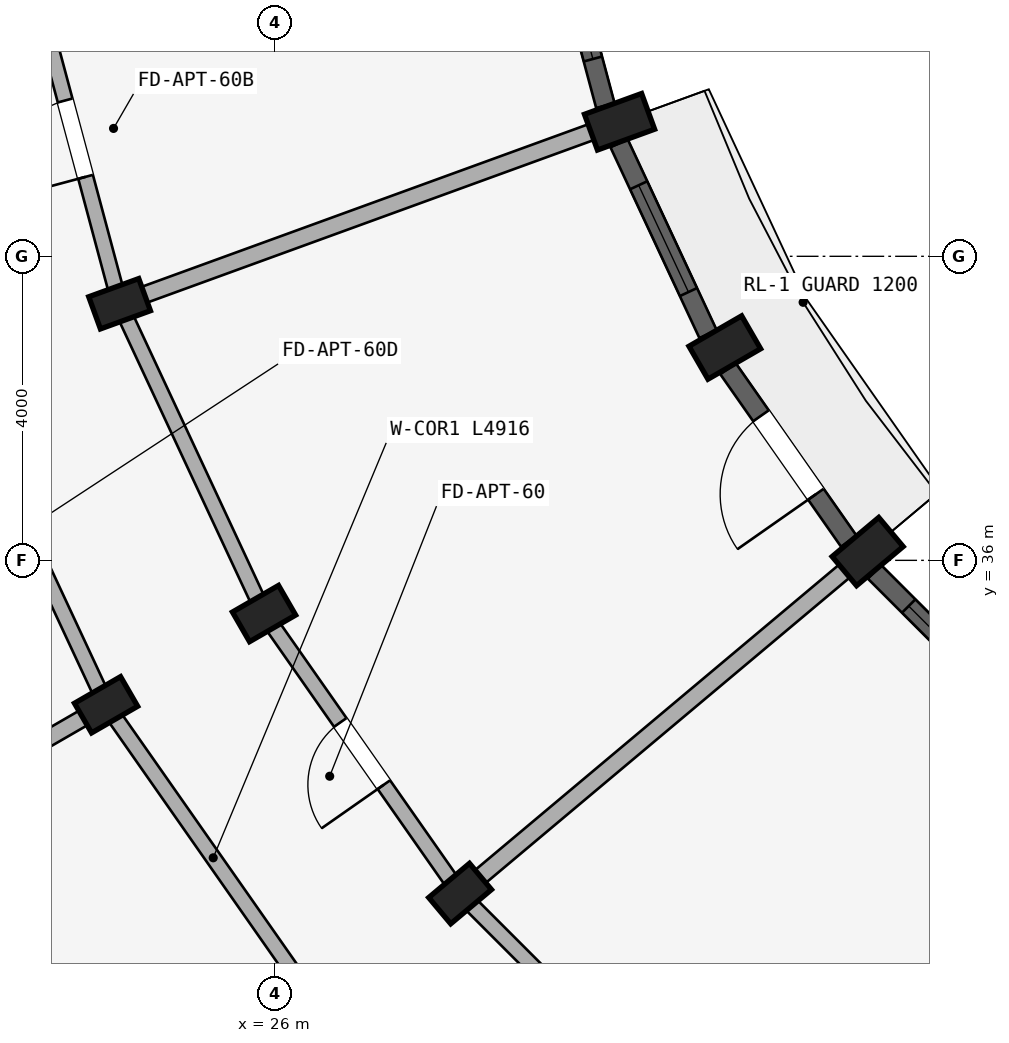
"""IFC4 building model, lengths in metres.
Left out: names, types, materials, properties, quantities, classifications, styles, units other than length and angle.
Written with IfcOpenShell. Run it as: python <this file> out.ifc"""

import sys

from ifc_helpers import new_model, si_unit, direction, frame, frame_2d, origin, origin_2d, place, context, subcontext, project, spatial, rectangle, extrude, element, fill, save


model = new_model("IFC4")
c1 = context("Model", 3, precision=1e-05, world=origin(), true_north=direction((0.0, 1.0)))
c2 = subcontext(c1, "Body", "Model", "MODEL_VIEW")
j1 = project(units=[si_unit("LENGTHUNIT", "METRE"), si_unit("PLANEANGLEUNIT", "RADIAN")], contexts=[c1])
p1 = place(None, origin())
s1 = spatial("IfcSite", under=j1, at=p1, CompositionType="ELEMENT")
p2 = place(p1, origin())
s2 = spatial("IfcBuilding", under=s1, at=p2, CompositionType="ELEMENT")
p3 = place(p2, frame((0.0, 0.0, 21.3)))
s3 = spatial("IfcBuildingStorey", under=s2, at=p3, CompositionType="ELEMENT", Elevation=21.3)
p4 = place(p3, frame((33.798, 36.115, 0.0), z_axis=(0.0, 0.0, 1.0), x_axis=(-0.642787609687, 0.766044443119, 0.0)))
e1 = element("IfcColumn", 1, at=p4, inside=s3, PredefinedType="COLUMN", context=c2, shape_type="SweptSolid", body=[
    extrude(rectangle(XDim=0.5, YDim=0.8, at=origin_2d()), origin(), (0.0, 0.0, 1.0), 2.93),
])
p5 = place(p3, frame((28.436, 31.616, 0.0), z_axis=(0.0, 0.0, 1.0), x_axis=(-0.642787609687, 0.766044443119, 0.0)))
e2 = element("IfcColumn", 2, at=p5, inside=s3, PredefinedType="COLUMN", context=c2, shape_type="SweptSolid", body=[
    extrude(rectangle(XDim=0.45, YDim=0.7, at=origin_2d()), origin(), (0.0, 0.0, 1.0), 2.93),
])
p6 = place(p3, frame((31.919, 38.8, 0.0), z_axis=(0.0, 0.0, 1.0), x_axis=(-0.5, 0.866025403784, 0.0)))
e3 = element("IfcColumn", 3, at=p6, inside=s3, PredefinedType="COLUMN", context=c2, shape_type="SweptSolid", body=[
    extrude(rectangle(XDim=0.5, YDim=0.8, at=origin_2d()), origin(), (0.0, 0.0, 1.0), 2.93),
])
for number, where, z_axis, x_axis in (
    (4, (25.856, 35.3, 0.0), (0.0, 0.0, 1.0), (-0.5, 0.866, 0.0)),
    (5, (23.778, 34.1, 0.0), (0.0, 0.0, 1.0), (-0.5, 0.866, 0.0)),
):
    element("IfcColumn", number, at=place(p3, frame(where, z_axis=z_axis, x_axis=x_axis)), inside=s3, PredefinedType="COLUMN", context=c2, shape_type="SweptSolid", body=[
        extrude(rectangle(XDim=0.45, YDim=0.7, at=origin_2d()), origin(), (0.0, 0.0, 1.0), 2.93),
    ])
p7 = place(p3, frame((30.534, 41.77, 0.0), z_axis=(0.0, 0.0, 1.0), x_axis=(-0.342020143326, 0.939692620786, 0.0)))
e6 = element("IfcColumn", 6, at=p7, inside=s3, PredefinedType="COLUMN", context=c2, shape_type="SweptSolid", body=[
    extrude(rectangle(XDim=0.5, YDim=0.8, at=origin_2d()), origin(), (0.0, 0.0, 1.0), 2.93),
])
p8 = place(p3, frame((23.956, 39.376, 0.0), z_axis=(0.0, 0.0, 1.0), x_axis=(-0.342020143326, 0.939692620786, 0.0)))
e7 = element("IfcColumn", 7, at=p8, inside=s3, PredefinedType="COLUMN", context=c2, shape_type="SweptSolid", body=[
    extrude(rectangle(XDim=0.45, YDim=0.7, at=origin_2d()), origin(), (0.0, 0.0, 1.0), 2.93),
])
p9 = place(p3, frame((31.616, 28.436, 0.0), z_axis=(0.0, 0.0, 1.0), x_axis=(-0.707106781187, 0.707106781187, 0.0)))
e8 = element("IfcWall", 8, at=p9, inside=s3, PredefinedType="STANDARD", context=c2, shape_type="SweptSolid", body=[
    extrude(rectangle(XDim=4.497, YDim=0.2, at=frame_2d((2.249, 0.0))), origin(), (0.0, 0.0, 1.0), 2.372),
])
p10 = place(p3, frame((28.436, 31.616, 0.0), z_axis=(0.0, 0.0, 1.0), x_axis=(-0.573571637217, 0.819155404658, 0.0)))
e9 = element("IfcWall", 9, at=p10, inside=s3, PredefinedType="STANDARD", context=c2, shape_type="SweptSolid", body=[
    extrude(rectangle(XDim=4.497, YDim=0.2, at=frame_2d((2.249, 0.0))), origin(), (0.0, 0.0, 1.0), 2.372),
])
p11 = place(p10, frame((1.749, 0.0, 0.0)))
e10 = element("IfcOpeningElement", 10, at=p11, cuts=e9, PredefinedType="OPENING", context=c2, shape_type="SweptSolid", body=[
    extrude(rectangle(XDim=1.0, YDim=2.15, at=frame_2d((0.5, 1.075))), frame((0.0, 0.11, 0.0), z_axis=(0.0, -1.0, 0.0), x_axis=(1.0, 0.0, 0.0)), (0.0, 0.0, 1.0), 0.22),
])
p12 = place(p3, frame((26.598, 30.073, 0.0), z_axis=(0.0, 0.0, 1.0), x_axis=(-0.573592335331, 0.819140911474, 0.0)))
e11 = element("IfcWall", 11, at=p12, inside=s3, PredefinedType="STANDARD", context=c2, shape_type="SweptSolid", body=[
    extrude(rectangle(XDim=4.916, YDim=0.2, at=frame_2d((2.458, 0.0))), origin(), (0.0, 0.0, 1.0), 2.372),
])
p13 = place(p3, frame((25.856, 35.3, 0.0), z_axis=(0.0, 0.0, 1.0), x_axis=(-0.422617978463, 0.906307919131, 0.0)))
e12 = element("IfcWall", 12, at=p13, inside=s3, PredefinedType="STANDARD", context=c2, shape_type="SweptSolid", body=[
    extrude(rectangle(XDim=4.497, YDim=0.2, at=frame_2d((2.249, 0.0))), origin(), (0.0, 0.0, 1.0), 2.372),
])
p14 = place(p3, frame((23.778, 34.1, 0.0), z_axis=(0.0, 0.0, 1.0), x_axis=(-0.422629854778, 0.906302381024, 0.0)))
e13 = element("IfcWall", 13, at=p14, inside=s3, PredefinedType="STANDARD", context=c2, shape_type="SweptSolid", body=[
    extrude(rectangle(XDim=4.915, YDim=0.2, at=frame_2d((2.458, 0.0))), origin(), (0.0, 0.0, 1.0), 2.372),
])
p15 = place(p14, frame((1.888, 0.0, 0.0)))
e14 = element("IfcOpeningElement", 14, at=p15, cuts=e13, PredefinedType="OPENING", context=c2, shape_type="SweptSolid", body=[
    extrude(rectangle(XDim=1.14, YDim=2.15, at=frame_2d((0.57, 1.075))), frame((0.0, 0.11, 0.0), z_axis=(0.0, -1.0, 0.0), x_axis=(1.0, 0.0, 0.0)), (0.0, 0.0, 1.0), 0.22),
])
p16 = place(p3, frame((23.956, 39.376, 0.0), z_axis=(0.0, 0.0, 1.0), x_axis=(-0.258787642463, 0.965934240054, 0.0)))
e15 = element("IfcWall", 15, at=p16, inside=s3, PredefinedType="STANDARD", context=c2, shape_type="SweptSolid", body=[
    extrude(rectangle(XDim=4.497, YDim=0.2, at=frame_2d((2.249, 0.0))), origin(), (0.0, 0.0, 1.0), 2.372),
])
p17 = place(p16, frame((1.729, 0.0, 0.0)))
e16 = element("IfcOpeningElement", 16, at=p17, cuts=e15, PredefinedType="OPENING", context=c2, shape_type="SweptSolid", body=[
    extrude(rectangle(XDim=1.04, YDim=2.15, at=frame_2d((0.52, 1.075))), frame((0.0, 0.11, 0.0), z_axis=(0.0, -1.0, 0.0), x_axis=(1.0, 0.0, 0.0)), (0.0, 0.0, 1.0), 0.22),
])
p18 = place(p3, frame((33.645, 35.987, 0.0), z_axis=(0.0, 0.0, 1.0), x_axis=(-0.766046761698, -0.642784846501, 0.0)))
e17 = element("IfcWall", 17, at=p18, inside=s3, PredefinedType="STANDARD", context=c2, shape_type="SweptSolid", body=[
    extrude(rectangle(XDim=6.75, YDim=0.22, at=frame_2d((3.375, 0.0))), origin(), (0.0, 0.0, 1.0), 2.372),
])
p19 = place(p3, frame((23.691, 34.05, 0.0), z_axis=(0.0, 0.0, 1.0), x_axis=(-0.866020956416, -0.500007702989, 0.0)))
e18 = element("IfcWall", 18, at=p19, inside=s3, PredefinedType="STANDARD", context=c2, shape_type="SweptSolid", body=[
    extrude(rectangle(XDim=14.62, YDim=0.22, at=frame_2d((7.31, 0.0))), origin(), (0.0, 0.0, 1.0), 2.372),
])
p20 = place(p3, frame((30.346, 41.702, 0.0), z_axis=(0.0, 0.0, 1.0), x_axis=(-0.939696231917, -0.342010221662, 0.0)))
e19 = element("IfcWall", 19, at=p20, inside=s3, PredefinedType="STANDARD", context=c2, shape_type="SweptSolid", body=[
    extrude(rectangle(XDim=6.75, YDim=0.22, at=frame_2d((3.375, 0.0))), origin(), (0.0, 0.0, 1.0), 2.372),
])
p21 = place(p3, frame((35.848, 33.889, 0.0), z_axis=(0.0, 0.0, 1.0), x_axis=(-0.707106781187, 0.707106781187, 0.0)))
e20 = element("IfcWall", 20, at=p21, inside=s3, PredefinedType="STANDARD", context=c2, shape_type="SweptSolid", body=[
    extrude(rectangle(XDim=2.77, YDim=0.25, at=frame_2d((1.385, 0.0))), origin(), (0.0, 0.0, 1.0), 2.472),
])
p22 = place(p21, frame((0.635, 0.0, 0.622)))
e21 = element("IfcOpeningElement", 21, at=p22, cuts=e20, PredefinedType="OPENING", context=c2, shape_type="SweptSolid", body=[
    extrude(rectangle(XDim=1.5, YDim=1.65, at=frame_2d((0.75, 0.825))), frame((0.0, 0.135, 0.0), z_axis=(0.0, -1.0, 0.0), x_axis=(1.0, 0.0, 0.0)), (0.0, 0.0, 1.0), 0.27),
])
p23 = place(p3, frame((33.551, 36.252, 0.0), z_axis=(0.0, 0.0, 1.0), x_axis=(-0.573633885053, 0.819111815273, 0.0)))
e22 = element("IfcWall", 22, at=p23, inside=s3, PredefinedType="STANDARD", context=c2, shape_type="SweptSolid", body=[
    extrude(rectangle(XDim=2.77, YDim=0.25, at=frame_2d((1.385, 0.0))), origin(), (0.0, 0.0, 1.0), 2.472),
])
p24 = place(p23, frame((0.755, 0.0, 0.0)))
e23 = element("IfcOpeningElement", 23, at=p24, cuts=e22, PredefinedType="OPENING", context=c2, shape_type="SweptSolid", body=[
    extrude(rectangle(XDim=1.26, YDim=2.15, at=frame_2d((0.63, 1.075))), frame((0.0, 0.135, 0.0), z_axis=(0.0, -1.0, 0.0), x_axis=(1.0, 0.0, 0.0)), (0.0, 0.0, 1.0), 0.27),
])
p25 = place(p3, frame((31.698, 38.977, 0.0), z_axis=(0.0, 0.0, 1.0), x_axis=(-0.422649007088, 0.906293449611, 0.0)))
e24 = element("IfcWall", 24, at=p25, inside=s3, PredefinedType="STANDARD", context=c2, shape_type="SweptSolid", body=[
    extrude(rectangle(XDim=2.77, YDim=0.25, at=frame_2d((1.385, 0.0))), origin(), (0.0, 0.0, 1.0), 2.472),
])
p26 = place(p25, frame((0.61, 0.0, 0.672)))
e25 = element("IfcOpeningElement", 25, at=p26, cuts=e24, PredefinedType="OPENING", context=c2, shape_type="SweptSolid", body=[
    extrude(rectangle(XDim=1.55, YDim=1.6, at=frame_2d((0.775, 0.8))), frame((0.0, 0.135, 0.0), z_axis=(0.0, -1.0, 0.0), x_axis=(1.0, 0.0, 0.0)), (0.0, 0.0, 1.0), 0.27),
])
p27 = place(p3, frame((30.347, 41.983, 0.0), z_axis=(0.0, 0.0, 1.0), x_axis=(-0.25878161084, 0.965935855992, 0.0)))
e26 = element("IfcWall", 26, at=p27, inside=s3, PredefinedType="STANDARD", context=c2, shape_type="SweptSolid", body=[
    extrude(rectangle(XDim=2.77, YDim=0.25, at=frame_2d((1.385, 0.0))), origin(), (0.0, 0.0, 1.0), 2.472),
])
p28 = place(p27, frame((0.635, 0.0, 0.622)))
e27 = element("IfcOpeningElement", 27, at=p28, cuts=e26, PredefinedType="OPENING", context=c2, shape_type="SweptSolid", body=[
    extrude(rectangle(XDim=1.5, YDim=1.65, at=frame_2d((0.75, 0.825))), frame((0.0, 0.135, 0.0), z_axis=(0.0, -1.0, 0.0), x_axis=(1.0, 0.0, 0.0)), (0.0, 0.0, 1.0), 0.27),
])
p29 = place(p22, origin())
e28 = element("IfcWindow", 28, at=p29, inside=s3, PartitioningType="DOUBLE_PANEL_VERTICAL", PredefinedType="WINDOW", context=c2, shape_type="SweptSolid", body=[
    extrude(rectangle(XDim=1.5, YDim=1.65, at=frame_2d((0.75, 0.825))), frame((0.0, 0.03, 0.0), z_axis=(0.0, -1.0, 0.0), x_axis=(1.0, 0.0, 0.0)), (0.0, 0.0, 1.0), 0.06),
])
fill(e21, e28)
p30 = place(p26, origin())
e29 = element("IfcWindow", 29, at=p30, inside=s3, PartitioningType="DOUBLE_PANEL_VERTICAL", PredefinedType="WINDOW", context=c2, shape_type="SweptSolid", body=[
    extrude(rectangle(XDim=1.55, YDim=1.6, at=frame_2d((0.775, 0.8))), frame((0.0, 0.03, 0.0), z_axis=(0.0, -1.0, 0.0), x_axis=(1.0, 0.0, 0.0)), (0.0, 0.0, 1.0), 0.06),
])
fill(e25, e29)
p31 = place(p28, origin())
e30 = element("IfcWindow", 30, at=p31, inside=s3, PartitioningType="DOUBLE_PANEL_VERTICAL", PredefinedType="WINDOW", context=c2, shape_type="SweptSolid", body=[
    extrude(rectangle(XDim=1.5, YDim=1.65, at=frame_2d((0.75, 0.825))), frame((0.0, 0.03, 0.0), z_axis=(0.0, -1.0, 0.0), x_axis=(1.0, 0.0, 0.0)), (0.0, 0.0, 1.0), 0.06),
])
fill(e27, e30)
p32 = place(p11, frame((1.0, 0.0, 0.0), z_axis=(0.0, 0.0, 1.0), x_axis=(-1.0, 0.0, 0.0)))
e31 = element("IfcDoor", 31, at=p32, inside=s3, OperationType="SINGLE_SWING_RIGHT", PredefinedType="DOOR", context=c2, shape_type="SweptSolid", body=[
    extrude(rectangle(XDim=1.0, YDim=2.15, at=frame_2d((0.5, 1.075))), frame((0.0, 0.025, 0.0), z_axis=(0.0, -1.0, 0.0), x_axis=(1.0, 0.0, 0.0)), (0.0, 0.0, 1.0), 0.05),
])
fill(e10, e31)
p33 = place(p17, origin())
e32 = element("IfcDoor", 32, at=p33, inside=s3, OperationType="SINGLE_SWING_LEFT", PredefinedType="DOOR", context=c2, shape_type="SweptSolid", body=[
    extrude(rectangle(XDim=1.04, YDim=2.15, at=frame_2d((0.52, 1.075))), frame((0.0, 0.025, 0.0), z_axis=(0.0, -1.0, 0.0), x_axis=(1.0, 0.0, 0.0)), (0.0, 0.0, 1.0), 0.05),
])
fill(e16, e32)
p34 = place(p24, frame((1.26, 0.0, 0.0), z_axis=(0.0, 0.0, 1.0), x_axis=(-1.0, 0.0, 0.0)))
e33 = element("IfcDoor", 33, at=p34, inside=s3, OperationType="SINGLE_SWING_RIGHT", PredefinedType="DOOR", context=c2, shape_type="SweptSolid", body=[
    extrude(rectangle(XDim=1.26, YDim=2.15, at=frame_2d((0.63, 1.075))), frame((0.0, 0.025, 0.0), z_axis=(0.0, -1.0, 0.0), x_axis=(1.0, 0.0, 0.0)), (0.0, 0.0, 1.0), 0.05),
])
fill(e23, e33)
save(model, sys.argv[1])
